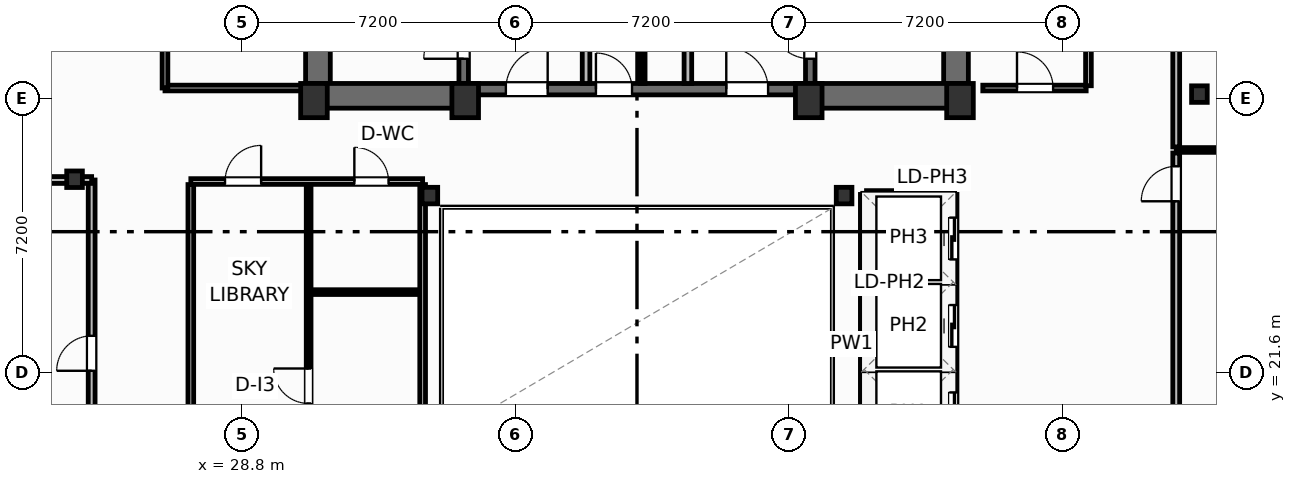
"""IFC4 building model, lengths in metres.
Left out: names, types, materials, properties, quantities, classifications, styles, units other than length and angle.
Written with IfcOpenShell. Run it as: python <this file> out.ifc"""

import sys

from ifc_helpers import new_model, si_unit, direction, frame, frame_2d, origin, origin_2d, place, context, subcontext, project, spatial, rectangle, i_section, extrude, element, fill, save


model = new_model("IFC4")
c1 = context("Model", 3, precision=1e-05, world=origin(), true_north=direction((0.0, 1.0)))
c2 = subcontext(c1, "Body", "Model", "MODEL_VIEW")
j1 = project(units=[si_unit("LENGTHUNIT", "METRE"), si_unit("PLANEANGLEUNIT", "RADIAN")], contexts=[c1])
p1 = place(None, origin())
s1 = spatial("IfcSite", under=j1, at=p1, CompositionType="ELEMENT")
p2 = place(p1, origin())
s2 = spatial("IfcBuilding", under=s1, at=p2, CompositionType="ELEMENT")
p3 = place(p2, frame((0.0, 0.0, 227.5)))
s3 = spatial("IfcBuildingStorey", under=s2, at=p3, CompositionType="ELEMENT", Elevation=227.5)
for number, where, z_axis, x_axis in (
    (1, (30.7, 28.75, 0.0), (0.0, 0.0, 1.0), (1.0, 0.0, 0.0)),
    (2, (34.68, 28.75, 0.0), (0.0, 0.0, 1.0), (1.0, 0.0, 0.0)),
    (3, (43.72, 28.75, 0.0), (0.0, 0.0, 1.0), (1.0, 0.0, 0.0)),
    (4, (47.7, 28.75, 0.0), (0.0, 0.0, 1.0), (1.0, 0.0, 0.0)),
):
    element("IfcColumn", number, at=place(p3, frame(where, z_axis=z_axis, x_axis=x_axis)), inside=s3, PredefinedType="COLUMN", context=c2, shape_type="SweptSolid", body=[
        extrude(rectangle(XDim=0.7, YDim=0.9, at=origin_2d()), origin(), (0.0, 0.0, 1.0), 3.7),
    ])
for number, where, z_axis, x_axis in (
    (5, (33.75, 26.25, 0.0), (0.0, 0.0, 1.0), (1.0, 0.0, 0.0)),
    (6, (44.65, 26.25, 0.0), (0.0, 0.0, 1.0), (1.0, 0.0, 0.0)),
    (7, (24.4, 26.68, 0.0), (0.0, 0.0, 1.0), (1.0, 0.0, 0.0)),
    (8, (54.0, 28.92, 0.0), (0.0, 0.0, 1.0), (1.0, 0.0, 0.0)),
):
    element("IfcColumn", number, at=place(p3, frame(where, z_axis=z_axis, x_axis=x_axis)), inside=s3, PredefinedType="COLUMN", context=c2, shape_type="SweptSolid", body=[
        extrude(i_section(OverallWidth=0.412, OverallDepth=0.435, WebThickness=0.036, FlangeThickness=0.057, FilletRadius=0.025, at=origin_2d()), origin(), (0.0, 0.0, 1.0), 3.7),
    ])
for number, where, z_axis, x_axis in (
    (9, (30.805, 29.2, 0.0), (0.0, 0.0, 1.0), (0.0, 1.0, 0.0)),
    (10, (47.595, 29.2, 0.0), (0.0, 0.0, 1.0), (0.0, 1.0, 0.0)),
):
    element("IfcWall", number, at=place(p3, frame(where, z_axis=z_axis, x_axis=x_axis)), inside=s3, PredefinedType="SHEAR", context=c2, shape_type="SweptSolid", body=[
        extrude(rectangle(XDim=9.22, YDim=0.65, at=frame_2d((4.61, 0.0))), origin(), (0.0, 0.0, 1.0), 3.45),
    ])
p4 = place(p3, frame((30.48, 28.875, 0.0), z_axis=(0.0, 0.0, 1.0), x_axis=(1.0, 0.0, 0.0)))
e11 = element("IfcWall", 11, at=p4, inside=s3, PredefinedType="SHEAR", context=c2, shape_type="SweptSolid", body=[
    extrude(rectangle(XDim=4.32, YDim=0.65, at=frame_2d((2.16, 0.0))), origin(), (0.0, 0.0, 1.0), 3.45),
])
p5 = place(p3, frame((43.6, 28.875, 0.0), z_axis=(0.0, 0.0, 1.0), x_axis=(1.0, 0.0, 0.0)))
e12 = element("IfcWall", 12, at=p5, inside=s3, PredefinedType="SHEAR", context=c2, shape_type="SweptSolid", body=[
    extrude(rectangle(XDim=4.32, YDim=0.65, at=frame_2d((2.16, 0.0))), origin(), (0.0, 0.0, 1.0), 3.45),
])
p6 = place(p3, frame((34.8, 29.05, 0.0), z_axis=(0.0, 0.0, 1.0), x_axis=(1.0, 0.0, 0.0)))
e13 = element("IfcWall", 13, at=p6, inside=s3, PredefinedType="SHEAR", context=c2, shape_type="SweptSolid", body=[
    extrude(rectangle(XDim=8.8, YDim=0.3, at=frame_2d((4.4, 0.0))), origin(), (0.0, 0.0, 1.0), 3.45),
])
p7 = place(p6, frame((0.95, 0.0, 0.0)))
e14 = element("IfcOpeningElement", 14, at=p7, cuts=e13, PredefinedType="OPENING", context=c2, shape_type="SweptSolid", body=[
    extrude(rectangle(XDim=1.1, YDim=2.15, at=frame_2d((0.55, 1.075))), frame((0.0, 0.16, 0.0), z_axis=(0.0, -1.0, 0.0), x_axis=(1.0, 0.0, 0.0)), (0.0, 0.0, 1.0), 0.32),
])
p8 = place(p6, frame((6.75, 0.0, 0.0)))
e15 = element("IfcOpeningElement", 15, at=p8, cuts=e13, PredefinedType="OPENING", context=c2, shape_type="SweptSolid", body=[
    extrude(rectangle(XDim=1.1, YDim=2.15, at=frame_2d((0.55, 1.075))), frame((0.0, 0.16, 0.0), z_axis=(0.0, -1.0, 0.0), x_axis=(1.0, 0.0, 0.0)), (0.0, 0.0, 1.0), 0.32),
])
p9 = place(p6, frame((3.32, 0.0, 0.0)))
e16 = element("IfcOpeningElement", 16, at=p9, cuts=e13, PredefinedType="OPENING", context=c2, shape_type="SweptSolid", body=[
    extrude(rectangle(XDim=0.95, YDim=2.15, at=frame_2d((0.475, 1.075))), frame((0.0, 0.16, 0.0), z_axis=(0.0, -1.0, 0.0), x_axis=(1.0, 0.0, 0.0)), (0.0, 0.0, 1.0), 0.32),
])
p10 = place(p3, frame((34.64, 29.2, 0.0), z_axis=(0.0, 0.0, 1.0), x_axis=(0.0, 1.0, 0.0)))
e17 = element("IfcWall", 17, at=p10, inside=s3, PredefinedType="SHEAR", context=c2, shape_type="SweptSolid", body=[
    extrude(rectangle(XDim=9.22, YDim=0.25, at=frame_2d((4.61, 0.0))), origin(), (0.0, 0.0, 1.0), 3.45),
])
p11 = place(p10, frame((0.65, 0.0, 0.0)))
e18 = element("IfcOpeningElement", 18, at=p11, cuts=e17, PredefinedType="OPENING", context=c2, shape_type="SweptSolid", body=[
    extrude(rectangle(XDim=1.05, YDim=2.15, at=frame_2d((0.525, 1.075))), frame((0.0, 0.135, 0.0), z_axis=(0.0, -1.0, 0.0), x_axis=(1.0, 0.0, 0.0)), (0.0, 0.0, 1.0), 0.27),
])
p12 = place(p3, frame((43.76, 29.2, 0.0), z_axis=(0.0, 0.0, 1.0), x_axis=(0.0, 1.0, 0.0)))
e19 = element("IfcWall", 19, at=p12, inside=s3, PredefinedType="SHEAR", context=c2, shape_type="SweptSolid", body=[
    extrude(rectangle(XDim=9.22, YDim=0.25, at=frame_2d((4.61, 0.0))), origin(), (0.0, 0.0, 1.0), 3.45),
])
p13 = place(p12, frame((0.65, 0.0, 0.0)))
e20 = element("IfcOpeningElement", 20, at=p13, cuts=e19, PredefinedType="OPENING", context=c2, shape_type="SweptSolid", body=[
    extrude(rectangle(XDim=1.05, YDim=2.15, at=frame_2d((0.525, 1.075))), frame((0.0, 0.135, 0.0), z_axis=(0.0, -1.0, 0.0), x_axis=(1.0, 0.0, 0.0)), (0.0, 0.0, 1.0), 0.27),
])
p14 = place(p3, frame((24.85, 19.24, 0.0), z_axis=(0.0, 0.0, 1.0), x_axis=(0.0, 1.0, 0.0)))
e21 = element("IfcWall", 21, at=p14, inside=s3, PredefinedType="PARTITIONING", context=c2, shape_type="SweptSolid", body=[
    extrude(rectangle(XDim=7.42, YDim=0.18, at=frame_2d((3.71, 0.0))), origin(), (0.0, 0.0, 1.0), 3.45),
])
p15 = place(p14, frame((2.4, 0.0, 0.0)))
e22 = element("IfcOpeningElement", 22, at=p15, cuts=e21, PredefinedType="OPENING", context=c2, shape_type="SweptSolid", body=[
    extrude(rectangle(XDim=0.92, YDim=2.05, at=frame_2d((0.46, 1.025))), frame((0.0, 0.1, 0.0), z_axis=(0.0, -1.0, 0.0), x_axis=(1.0, 0.0, 0.0)), (0.0, 0.0, 1.0), 0.2),
])
p16 = place(p3, frame((3.482, 26.66, 0.0), z_axis=(0.0, 0.0, 1.0), x_axis=(1.0, 0.0, 0.0)))
e23 = element("IfcWall", 23, at=p16, inside=s3, PredefinedType="PARTITIONING", context=c2, shape_type="SweptSolid", body=[
    extrude(rectangle(XDim=21.368, YDim=0.18, at=frame_2d((10.684, 0.0))), origin(), (0.0, 0.0, 1.0), 2.662),
])
p17 = place(p3, frame((53.39, 19.3, 0.0), z_axis=(0.0, 0.0, 1.0), x_axis=(0.0, 1.0, 0.0)))
e24 = element("IfcWall", 24, at=p17, inside=s3, PredefinedType="PARTITIONING", context=c2, shape_type="SweptSolid", body=[
    extrude(rectangle(XDim=8.07, YDim=0.18, at=frame_2d((4.035, 0.0))), origin(), (0.0, 0.0, 1.0), 3.45),
])
p18 = place(p17, frame((6.8, 0.0, 0.0)))
e25 = element("IfcOpeningElement", 25, at=p18, cuts=e24, PredefinedType="OPENING", context=c2, shape_type="SweptSolid", body=[
    extrude(rectangle(XDim=0.92, YDim=2.05, at=frame_2d((0.46, 1.025))), frame((0.0, 0.1, 0.0), z_axis=(0.0, -1.0, 0.0), x_axis=(1.0, 0.0, 0.0)), (0.0, 0.0, 1.0), 0.2),
])
p19 = place(p3, frame((53.39, 27.53, 0.0), z_axis=(0.0, 0.0, 1.0), x_axis=(0.0, 1.0, 0.0)))
e26 = element("IfcWall", 26, at=p19, inside=s3, PredefinedType="PARTITIONING", context=c2, shape_type="SweptSolid", body=[
    extrude(rectangle(XDim=11.67, YDim=0.18, at=frame_2d((5.835, 0.0))), origin(), (0.0, 0.0, 1.0), 3.45),
])
p20 = place(p19, frame((5.8, 0.0, 0.0)))
e27 = element("IfcOpeningElement", 27, at=p20, cuts=e26, PredefinedType="OPENING", context=c2, shape_type="SweptSolid", body=[
    extrude(rectangle(XDim=0.92, YDim=2.05, at=frame_2d((0.46, 1.025))), frame((0.0, 0.1, 0.0), z_axis=(0.0, -1.0, 0.0), x_axis=(1.0, 0.0, 0.0)), (0.0, 0.0, 1.0), 0.2),
])
p21 = place(p3, frame((53.39, 27.45, 0.0), z_axis=(0.0, 0.0, 1.0), x_axis=(1.0, 0.0, 0.0)))
e28 = element("IfcWall", 28, at=p21, inside=s3, PredefinedType="PARTITIONING", context=c2, shape_type="SweptSolid", body=[
    extrude(rectangle(XDim=20.199, YDim=0.125, at=frame_2d((10.1, 0.0))), origin(), (0.0, 0.0, 1.0), 2.739),
])
for number, where, z_axis, x_axis in (
    (29, (37.86, 29.2, 0.0), (0.0, 0.0, 1.0), (0.0, 1.0, 0.0)),
    (30, (40.54, 29.2, 0.0), (0.0, 0.0, 1.0), (0.0, 1.0, 0.0)),
):
    element("IfcWall", number, at=place(p3, frame(where, z_axis=z_axis, x_axis=x_axis)), inside=s3, PredefinedType="PARTITIONING", context=c2, shape_type="SweptSolid", body=[
        extrude(rectangle(XDim=5.18, YDim=0.2, at=frame_2d((2.59, 0.0))), origin(), (0.0, 0.0, 1.0), 3.45),
    ])
p22 = place(p3, frame((39.35, 29.2, 0.0), z_axis=(0.0, 0.0, 1.0), x_axis=(0.0, 1.0, 0.0)))
e31 = element("IfcWall", 31, at=p22, inside=s3, PredefinedType="PARTITIONING", context=c2, shape_type="SweptSolid", body=[
    extrude(rectangle(XDim=5.22, YDim=0.125, at=frame_2d((2.61, 0.0))), origin(), (0.0, 0.0, 1.0), 3.45),
])
p23 = place(p22, frame((2.05, 0.0, 0.0)))
e32 = element("IfcOpeningElement", 32, at=p23, cuts=e31, PredefinedType="OPENING", context=c2, shape_type="SweptSolid", body=[
    extrude(rectangle(XDim=0.85, YDim=2.05, at=frame_2d((0.425, 1.025))), frame((0.0, 0.073, 0.0), z_axis=(0.0, -1.0, 0.0), x_axis=(1.0, 0.0, 0.0)), (0.0, 0.0, 1.0), 0.145),
])
p24 = place(p3, frame((27.46, 26.62, 0.0), z_axis=(0.0, 0.0, 1.0), x_axis=(1.0, 0.0, 0.0)))
e33 = element("IfcWall", 33, at=p24, inside=s3, PredefinedType="PARTITIONING", context=c2, shape_type="SweptSolid", body=[
    extrude(rectangle(XDim=6.1, YDim=0.15, at=frame_2d((3.05, 0.0))), origin(), (0.0, 0.0, 1.0), 2.662),
])
p25 = place(p24, frame((0.9, 0.0, 0.0)))
e34 = element("IfcOpeningElement", 34, at=p25, cuts=e33, PredefinedType="OPENING", context=c2, shape_type="SweptSolid", body=[
    extrude(rectangle(XDim=0.95, YDim=2.05, at=frame_2d((0.475, 1.025))), frame((0.0, 0.085, 0.0), z_axis=(0.0, -1.0, 0.0), x_axis=(1.0, 0.0, 0.0)), (0.0, 0.0, 1.0), 0.17),
])
p26 = place(p24, frame((4.303, 0.0, 0.0)))
e35 = element("IfcOpeningElement", 35, at=p26, cuts=e33, PredefinedType="OPENING", context=c2, shape_type="SweptSolid", body=[
    extrude(rectangle(XDim=0.9, YDim=2.05, at=frame_2d((0.45, 1.025))), frame((0.0, 0.085, 0.0), z_axis=(0.0, -1.0, 0.0), x_axis=(1.0, 0.0, 0.0)), (0.0, 0.0, 1.0), 0.17),
])
p27 = place(p3, frame((30.56, 19.38, 0.0), z_axis=(0.0, 0.0, 1.0), x_axis=(0.0, 1.0, 0.0)))
e36 = element("IfcWall", 36, at=p27, inside=s3, PredefinedType="PARTITIONING", context=c2, shape_type="SweptSolid", body=[
    extrude(rectangle(XDim=7.16, YDim=0.125, at=frame_2d((3.58, 0.0))), origin(), (0.0, 0.0, 1.0), 3.45),
])
p28 = place(p27, frame((1.4, 0.0, 0.0)))
e37 = element("IfcOpeningElement", 37, at=p28, cuts=e36, PredefinedType="OPENING", context=c2, shape_type="SweptSolid", body=[
    extrude(rectangle(XDim=0.92, YDim=2.05, at=frame_2d((0.46, 1.025))), frame((0.0, 0.073, 0.0), z_axis=(0.0, -1.0, 0.0), x_axis=(1.0, 0.0, 0.0)), (0.0, 0.0, 1.0), 0.145),
])
p29 = place(p3, frame((30.64, 23.71, 0.0), z_axis=(0.0, 0.0, 1.0), x_axis=(1.0, 0.0, 0.0)))
e38 = element("IfcWall", 38, at=p29, inside=s3, PredefinedType="PARTITIONING", context=c2, shape_type="SweptSolid", body=[
    extrude(rectangle(XDim=2.88, YDim=0.125, at=frame_2d((1.44, 0.0))), origin(), (0.0, 0.0, 1.0), 3.45),
])
p30 = place(p3, frame((27.46, 19.38, 0.0), z_axis=(0.0, 0.0, 1.0), x_axis=(0.0, 1.0, 0.0)))
e39 = element("IfcWall", 39, at=p30, inside=s3, PredefinedType="PARTITIONING", context=c2, shape_type="SweptSolid", body=[
    extrude(rectangle(XDim=7.16, YDim=0.15, at=frame_2d((3.58, 0.0))), origin(), (0.0, 0.0, 1.0), 3.45),
])
p31 = place(p3, frame((33.56, 19.38, 0.0), z_axis=(0.0, 0.0, 1.0), x_axis=(0.0, 1.0, 0.0)))
e40 = element("IfcWall", 40, at=p31, inside=s3, PredefinedType="PARTITIONING", context=c2, shape_type="SweptSolid", body=[
    extrude(rectangle(XDim=7.16, YDim=0.15, at=frame_2d((3.58, 0.0))), origin(), (0.0, 0.0, 1.0), 2.824),
])
p32 = place(p3, frame((26.78, 29.08, 0.0), z_axis=(0.0, 0.0, 1.0), x_axis=(1.0, 0.0, 0.0)))
e41 = element("IfcWall", 41, at=p32, inside=s3, PredefinedType="PARTITIONING", context=c2, shape_type="SweptSolid", body=[
    extrude(rectangle(XDim=3.7, YDim=0.15, at=frame_2d((1.85, 0.0))), origin(), (0.0, 0.0, 1.0), 3.45),
])
p33 = place(p3, frame((26.78, 29.08, 0.0), z_axis=(0.0, 0.0, 1.0), x_axis=(0.0, 1.0, 0.0)))
e42 = element("IfcWall", 42, at=p33, inside=s3, PredefinedType="PARTITIONING", context=c2, shape_type="SweptSolid", body=[
    extrude(rectangle(XDim=9.18, YDim=0.15, at=frame_2d((4.59, 0.0))), origin(), (0.0, 0.0, 1.0), 3.45),
])
p34 = place(p33, frame((2.4, 0.0, 0.0)))
e43 = element("IfcOpeningElement", 43, at=p34, cuts=e42, PredefinedType="OPENING", context=c2, shape_type="SweptSolid", body=[
    extrude(rectangle(XDim=0.95, YDim=2.05, at=frame_2d((0.475, 1.025))), frame((0.0, 0.085, 0.0), z_axis=(0.0, -1.0, 0.0), x_axis=(1.0, 0.0, 0.0)), (0.0, 0.0, 1.0), 0.17),
])
p35 = place(p3, frame((48.3, 29.08, 0.0), z_axis=(0.0, 0.0, 1.0), x_axis=(1.0, 0.0, 0.0)))
e44 = element("IfcWall", 44, at=p35, inside=s3, PredefinedType="PARTITIONING", context=c2, shape_type="SweptSolid", body=[
    extrude(rectangle(XDim=2.72, YDim=0.15, at=frame_2d((1.36, 0.0))), origin(), (0.0, 0.0, 1.0), 2.662),
])
p36 = place(p35, frame((0.9, 0.0, 0.0)))
e45 = element("IfcOpeningElement", 45, at=p36, cuts=e44, PredefinedType="OPENING", context=c2, shape_type="SweptSolid", body=[
    extrude(rectangle(XDim=0.95, YDim=2.05, at=frame_2d((0.475, 1.025))), frame((0.0, 0.085, 0.0), z_axis=(0.0, -1.0, 0.0), x_axis=(1.0, 0.0, 0.0)), (0.0, 0.0, 1.0), 0.17),
])
p37 = place(p3, frame((51.08, 29.14, 0.0), z_axis=(0.0, 0.0, 1.0), x_axis=(0.0, 1.0, 0.0)))
e46 = element("IfcWall", 46, at=p37, inside=s3, PredefinedType="PARTITIONING", context=c2, shape_type="SweptSolid", body=[
    extrude(rectangle(XDim=6.76, YDim=0.15, at=frame_2d((3.38, 0.0))), origin(), (0.0, 0.0, 1.0), 3.45),
])
for number, where, z_axis, x_axis in (
    (47, (45.24, 21.675, 0.0), (0.0, 0.0, 1.0), (1.0, 0.0, 0.0)),
    (48, (45.24, 23.975, 0.0), (0.0, 0.0, 1.0), (1.0, 0.0, 0.0)),
    (49, (45.24, 26.28, 0.0), (0.0, 0.0, 1.0), (1.0, 0.0, 0.0)),
):
    element("IfcWall", number, at=place(p3, frame(where, z_axis=z_axis, x_axis=x_axis)), inside=s3, PredefinedType="PARTITIONING", context=c2, shape_type="SweptSolid", body=[
        extrude(rectangle(XDim=2.22, YDim=0.2, at=frame_2d((1.11, 0.0))), origin(), (0.0, 0.0, 1.0), 3.45),
    ])
p38 = place(p3, frame((45.18, 19.38, 0.0), z_axis=(0.0, 0.0, 1.0), x_axis=(0.0, 1.0, 0.0)))
e50 = element("IfcWall", 50, at=p38, inside=s3, PredefinedType="PARTITIONING", context=c2, shape_type="SweptSolid", body=[
    extrude(rectangle(XDim=6.9, YDim=0.2, at=frame_2d((3.45, 0.0))), origin(), (0.0, 0.0, 1.0), 3.45),
])
p39 = place(p3, frame((47.52, 19.38, 0.0), z_axis=(0.0, 0.0, 1.0), x_axis=(0.0, 1.0, 0.0)))
e51 = element("IfcWall", 51, at=p39, inside=s3, PredefinedType="PARTITIONING", context=c2, shape_type="SweptSolid", body=[
    extrude(rectangle(XDim=6.9, YDim=0.2, at=frame_2d((3.45, 0.0))), origin(), (0.0, 0.0, 1.0), 3.45),
])
p40 = place(p39, frame((0.59, 0.0, 0.0)))
e52 = element("IfcOpeningElement", 52, at=p40, cuts=e51, PredefinedType="OPENING", context=c2, shape_type="SweptSolid", body=[
    extrude(rectangle(XDim=1.1, YDim=2.15, at=frame_2d((0.55, 1.075))), frame((0.0, 0.11, 0.0), z_axis=(0.0, -1.0, 0.0), x_axis=(1.0, 0.0, 0.0)), (0.0, 0.0, 1.0), 0.22),
])
p41 = place(p39, frame((2.89, 0.0, 0.0)))
e53 = element("IfcOpeningElement", 53, at=p41, cuts=e51, PredefinedType="OPENING", context=c2, shape_type="SweptSolid", body=[
    extrude(rectangle(XDim=1.1, YDim=2.15, at=frame_2d((0.55, 1.075))), frame((0.0, 0.11, 0.0), z_axis=(0.0, -1.0, 0.0), x_axis=(1.0, 0.0, 0.0)), (0.0, 0.0, 1.0), 0.22),
])
p42 = place(p39, frame((5.19, 0.0, 0.0)))
e54 = element("IfcOpeningElement", 54, at=p42, cuts=e51, PredefinedType="OPENING", context=c2, shape_type="SweptSolid", body=[
    extrude(rectangle(XDim=1.1, YDim=2.15, at=frame_2d((0.55, 1.075))), frame((0.0, 0.11, 0.0), z_axis=(0.0, -1.0, 0.0), x_axis=(1.0, 0.0, 0.0)), (0.0, 0.0, 1.0), 0.22),
])
p43 = place(p15, origin())
e55 = element("IfcDoor", 55, at=p43, inside=s3, OperationType="SINGLE_SWING_LEFT", PredefinedType="DOOR", context=c2, shape_type="SweptSolid", body=[
    extrude(rectangle(XDim=0.92, YDim=2.05, at=frame_2d((0.46, 1.025))), frame((0.0, 0.025, 0.0), z_axis=(0.0, -1.0, 0.0), x_axis=(1.0, 0.0, 0.0)), (0.0, 0.0, 1.0), 0.05),
])
fill(e22, e55)
p44 = place(p18, origin())
e56 = element("IfcDoor", 56, at=p44, inside=s3, OperationType="SINGLE_SWING_LEFT", PredefinedType="DOOR", context=c2, shape_type="SweptSolid", body=[
    extrude(rectangle(XDim=0.92, YDim=2.05, at=frame_2d((0.46, 1.025))), frame((0.0, 0.025, 0.0), z_axis=(0.0, -1.0, 0.0), x_axis=(1.0, 0.0, 0.0)), (0.0, 0.0, 1.0), 0.05),
])
fill(e25, e56)
p45 = place(p11, origin())
e57 = element("IfcDoor", 57, at=p45, inside=s3, OperationType="SINGLE_SWING_LEFT", PredefinedType="DOOR", context=c2, shape_type="SweptSolid", body=[
    extrude(rectangle(XDim=1.05, YDim=2.15, at=frame_2d((0.525, 1.075))), frame((0.0, 0.025, 0.0), z_axis=(0.0, -1.0, 0.0), x_axis=(1.0, 0.0, 0.0)), (0.0, 0.0, 1.0), 0.05),
])
fill(e18, e57)
p46 = place(p13, origin())
e58 = element("IfcDoor", 58, at=p46, inside=s3, OperationType="SINGLE_SWING_RIGHT", PredefinedType="DOOR", context=c2, shape_type="SweptSolid", body=[
    extrude(rectangle(XDim=1.05, YDim=2.15, at=frame_2d((0.525, 1.075))), frame((0.0, 0.025, 0.0), z_axis=(0.0, -1.0, 0.0), x_axis=(1.0, 0.0, 0.0)), (0.0, 0.0, 1.0), 0.05),
])
fill(e20, e58)
p47 = place(p7, origin())
e59 = element("IfcDoor", 59, at=p47, inside=s3, OperationType="SINGLE_SWING_RIGHT", PredefinedType="DOOR", context=c2, shape_type="SweptSolid", body=[
    extrude(rectangle(XDim=1.1, YDim=2.15, at=frame_2d((0.55, 1.075))), frame((0.0, 0.025, 0.0), z_axis=(0.0, -1.0, 0.0), x_axis=(1.0, 0.0, 0.0)), (0.0, 0.0, 1.0), 0.05),
])
fill(e14, e59)
p48 = place(p8, origin())
e60 = element("IfcDoor", 60, at=p48, inside=s3, OperationType="SINGLE_SWING_LEFT", PredefinedType="DOOR", context=c2, shape_type="SweptSolid", body=[
    extrude(rectangle(XDim=1.1, YDim=2.15, at=frame_2d((0.55, 1.075))), frame((0.0, 0.025, 0.0), z_axis=(0.0, -1.0, 0.0), x_axis=(1.0, 0.0, 0.0)), (0.0, 0.0, 1.0), 0.05),
])
fill(e15, e60)
p49 = place(p9, origin())
e61 = element("IfcDoor", 61, at=p49, inside=s3, OperationType="SINGLE_SWING_LEFT", PredefinedType="DOOR", context=c2, shape_type="SweptSolid", body=[
    extrude(rectangle(XDim=0.95, YDim=2.15, at=frame_2d((0.475, 1.075))), frame((0.0, 0.025, 0.0), z_axis=(0.0, -1.0, 0.0), x_axis=(1.0, 0.0, 0.0)), (0.0, 0.0, 1.0), 0.05),
])
fill(e16, e61)
p50 = place(p25, origin())
e62 = element("IfcDoor", 62, at=p50, inside=s3, OperationType="SINGLE_SWING_RIGHT", PredefinedType="DOOR", context=c2, shape_type="SweptSolid", body=[
    extrude(rectangle(XDim=0.95, YDim=2.05, at=frame_2d((0.475, 1.025))), frame((0.0, 0.025, 0.0), z_axis=(0.0, -1.0, 0.0), x_axis=(1.0, 0.0, 0.0)), (0.0, 0.0, 1.0), 0.05),
])
fill(e34, e62)
p51 = place(p26, origin())
e63 = element("IfcDoor", 63, at=p51, inside=s3, OperationType="SINGLE_SWING_LEFT", PredefinedType="DOOR", context=c2, shape_type="SweptSolid", body=[
    extrude(rectangle(XDim=0.9, YDim=2.05, at=frame_2d((0.45, 1.025))), frame((0.0, 0.025, 0.0), z_axis=(0.0, -1.0, 0.0), x_axis=(1.0, 0.0, 0.0)), (0.0, 0.0, 1.0), 0.05),
])
fill(e35, e63)
p52 = place(p28, origin())
e64 = element("IfcDoor", 64, at=p52, inside=s3, OperationType="SINGLE_SWING_RIGHT", PredefinedType="DOOR", context=c2, shape_type="SweptSolid", body=[
    extrude(rectangle(XDim=0.92, YDim=2.05, at=frame_2d((0.46, 1.025))), frame((0.0, 0.025, 0.0), z_axis=(0.0, -1.0, 0.0), x_axis=(1.0, 0.0, 0.0)), (0.0, 0.0, 1.0), 0.05),
])
fill(e37, e64)
p53 = place(p36, origin())
e65 = element("IfcDoor", 65, at=p53, inside=s3, OperationType="SINGLE_SWING_LEFT", PredefinedType="DOOR", context=c2, shape_type="SweptSolid", body=[
    extrude(rectangle(XDim=0.95, YDim=2.05, at=frame_2d((0.475, 1.025))), frame((0.0, 0.025, 0.0), z_axis=(0.0, -1.0, 0.0), x_axis=(1.0, 0.0, 0.0)), (0.0, 0.0, 1.0), 0.05),
])
fill(e45, e65)
p54 = place(p40, origin())
e66 = element("IfcDoor", 66, at=p54, inside=s3, OperationType="SLIDING_TO_LEFT", PredefinedType="DOOR", context=c2, shape_type="SweptSolid", body=[
    extrude(rectangle(XDim=1.1, YDim=2.15, at=frame_2d((0.55, 1.075))), frame((0.0, 0.025, 0.0), z_axis=(0.0, -1.0, 0.0), x_axis=(1.0, 0.0, 0.0)), (0.0, 0.0, 1.0), 0.05),
])
fill(e52, e66)
p55 = place(p41, origin())
e67 = element("IfcDoor", 67, at=p55, inside=s3, OperationType="SLIDING_TO_LEFT", PredefinedType="DOOR", context=c2, shape_type="SweptSolid", body=[
    extrude(rectangle(XDim=1.1, YDim=2.15, at=frame_2d((0.55, 1.075))), frame((0.0, 0.025, 0.0), z_axis=(0.0, -1.0, 0.0), x_axis=(1.0, 0.0, 0.0)), (0.0, 0.0, 1.0), 0.05),
])
fill(e53, e67)
p56 = place(p42, origin())
e68 = element("IfcDoor", 68, at=p56, inside=s3, OperationType="SLIDING_TO_LEFT", PredefinedType="DOOR", context=c2, shape_type="SweptSolid", body=[
    extrude(rectangle(XDim=1.1, YDim=2.15, at=frame_2d((0.55, 1.075))), frame((0.0, 0.025, 0.0), z_axis=(0.0, -1.0, 0.0), x_axis=(1.0, 0.0, 0.0)), (0.0, 0.0, 1.0), 0.05),
])
fill(e54, e68)
save(model, sys.argv[1])
